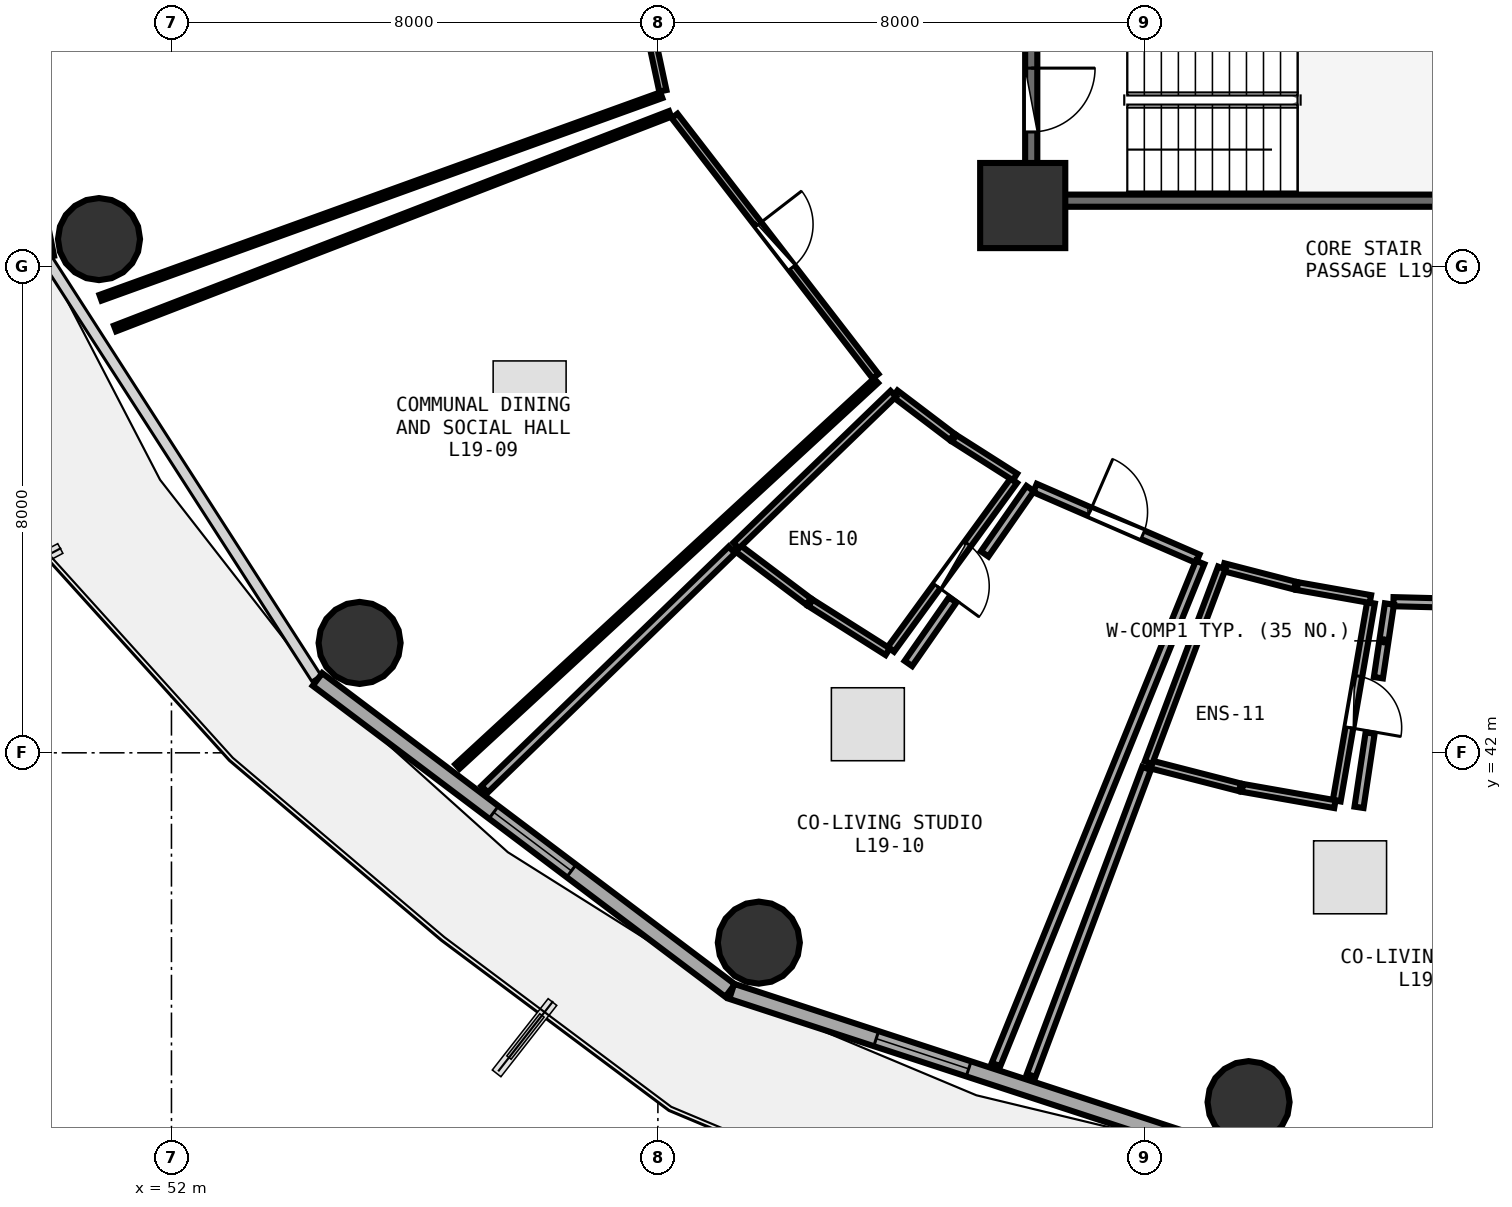
"""IFC4 building model, lengths in metres.
Left out: names, types, materials, properties, quantities, classifications, styles, units other than length and angle.
Written with IfcOpenShell. Run it as: python <this file> out.ifc"""

import sys

from ifc_helpers import new_model, si_unit, direction, frame, frame_2d, origin, origin_2d, place, context, subcontext, project, spatial, rectangle, circle, extrude, element, fill, save


model = new_model("IFC4")
c1 = context("Model", 3, precision=1e-05, world=origin(), true_north=direction((0.0, 1.0)))
c2 = subcontext(c1, "Body", "Model", "MODEL_VIEW")
j1 = project(units=[si_unit("LENGTHUNIT", "METRE"), si_unit("PLANEANGLEUNIT", "RADIAN")], contexts=[c1])
p1 = place(None, origin())
s1 = spatial("IfcSite", under=j1, at=p1, CompositionType="ELEMENT")
p2 = place(p1, origin())
s2 = spatial("IfcBuilding", under=s1, at=p2, CompositionType="ELEMENT")
p3 = place(p2, frame((0.0, 0.0, 76.35)))
s3 = spatial("IfcBuildingStorey", under=s2, at=p3, CompositionType="ELEMENT", Elevation=76.35)
p4 = place(p3, frame((66.0, 51.0, 0.0), z_axis=(0.0, 0.0, 1.0), x_axis=(1.0, 0.0, 0.0)))
e1 = element("IfcColumn", 1, at=p4, inside=s3, PredefinedType="PILASTER", context=c2, shape_type="SweptSolid", body=[
    extrude(rectangle(XDim=1.4, YDim=1.4, at=origin_2d()), origin(), (0.0, 0.0, 1.0), 3.75),
])
for number, where, z_axis, x_axis in (
    (2, (50.808, 50.448, 0.0), (0.0, 0.0, 1.0), (1.0, 0.0, 0.0)),
    (3, (55.094, 43.807, 0.0), (0.0, 0.0, 1.0), (1.0, 0.0, 0.0)),
    (4, (61.66, 38.878, 0.0), (0.0, 0.0, 1.0), (1.0, 0.0, 0.0)),
    (5, (69.714, 36.255, 0.0), (0.0, 0.0, 1.0), (1.0, 0.0, 0.0)),
):
    element("IfcColumn", number, at=place(p3, frame(where, z_axis=z_axis, x_axis=x_axis)), inside=s3, PredefinedType="COLUMN", context=c2, shape_type="SweptSolid", body=[
        extrude(circle(Radius=0.675, at=origin_2d()), origin(), (0.0, 0.0, 1.0), 3.75),
    ])
p5 = place(p3, frame((48.403, 57.985, 0.0), z_axis=(0.0, 0.0, 1.0), x_axis=(0.192581843632, -0.981280914674, 0.0)))
e6 = element("IfcWall", 6, at=p5, inside=s3, PredefinedType="SOLIDWALL", context=c2, shape_type="SweptSolid", body=[
    extrude(rectangle(XDim=7.987, YDim=0.26, at=frame_2d((3.993, 0.0))), origin(), (0.0, 0.0, 1.0), 3.475),
])
p6 = place(p5, frame((3.193, 0.0, 0.85)))
e7 = element("IfcOpeningElement", 7, at=p6, cuts=e6, PredefinedType="OPENING", context=c2, shape_type="SweptSolid", body=[
    extrude(rectangle(XDim=1.6, YDim=1.45, at=frame_2d((0.8, 0.725))), frame((0.0, 0.14, 0.0), z_axis=(0.0, -1.0, 0.0), x_axis=(1.0, 0.0, 0.0)), (0.0, 0.0, 1.0), 0.28),
])
p7 = place(p3, frame((54.401, 43.207, 0.0), z_axis=(0.0, 0.0, 1.0), x_axis=(0.798501507879, -0.601992808857, 0.0)))
e8 = element("IfcWall", 8, at=p7, inside=s3, PredefinedType="SOLIDWALL", context=c2, shape_type="SweptSolid", body=[
    extrude(rectangle(XDim=8.499, YDim=0.26, at=frame_2d((4.25, 0.0))), origin(), (0.0, 0.0, 1.0), 3.475),
])
p8 = place(p7, frame((3.63, 0.0, 0.85)))
e9 = element("IfcOpeningElement", 9, at=p8, cuts=e8, PredefinedType="OPENING", context=c2, shape_type="SweptSolid", body=[
    extrude(rectangle(XDim=1.6, YDim=1.45, at=frame_2d((0.8, 0.725))), frame((0.0, 0.14, 0.0), z_axis=(0.0, -1.0, 0.0), x_axis=(1.0, 0.0, 0.0)), (0.0, 0.0, 1.0), 0.28),
])
p9 = place(p3, frame((61.214, 38.077, 0.0), z_axis=(0.0, 0.0, 1.0), x_axis=(0.950471101963, -0.310812941064, 0.0)))
e10 = element("IfcWall", 10, at=p9, inside=s3, PredefinedType="SOLIDWALL", context=c2, shape_type="SweptSolid", body=[
    extrude(rectangle(XDim=8.76, YDim=0.26, at=frame_2d((4.38, 0.0))), origin(), (0.0, 0.0, 1.0), 3.475),
])
p10 = place(p9, frame((2.5, 0.0, 0.85)))
e11 = element("IfcOpeningElement", 11, at=p10, cuts=e10, PredefinedType="OPENING", context=c2, shape_type="SweptSolid", body=[
    extrude(rectangle(XDim=1.6, YDim=1.45, at=frame_2d((0.8, 0.725))), frame((0.0, 0.14, 0.0), z_axis=(0.0, -1.0, 0.0), x_axis=(1.0, 0.0, 0.0)), (0.0, 0.0, 1.0), 0.28),
])
p11 = place(p3, frame((66.26, 51.08, 0.0), z_axis=(0.0, 0.0, 1.0), x_axis=(1.0, 0.0, 0.0)))
e12 = element("IfcWall", 12, at=p11, inside=s3, PredefinedType="SHEAR", context=c2, shape_type="SweptSolid", body=[
    extrude(rectangle(XDim=7.16, YDim=0.2, at=frame_2d((3.58, 0.0))), origin(), (0.0, 0.0, 1.0), 3.49),
])
p12 = place(p3, frame((66.14, 54.27, 0.0), z_axis=(0.0, 0.0, 1.0), x_axis=(0.0, -1.0, 0.0)))
e13 = element("IfcWall", 13, at=p12, inside=s3, PredefinedType="SHEAR", context=c2, shape_type="SweptSolid", body=[
    extrude(rectangle(XDim=3.07, YDim=0.2, at=frame_2d((1.535, 0.0))), origin(), (0.0, 0.0, 1.0), 3.49),
])
p13 = place(p12, frame((1.01, 0.0, 0.0)))
e14 = element("IfcOpeningElement", 14, at=p13, cuts=e13, PredefinedType="OPENING", context=c2, shape_type="SweptSolid", body=[
    extrude(rectangle(XDim=1.05, YDim=2.1, at=frame_2d((0.525, 1.05))), frame((0.0, 0.11, 0.0), z_axis=(0.0, -1.0, 0.0), x_axis=(1.0, 0.0, 0.0)), (0.0, 0.0, 1.0), 0.22),
])
p14 = place(p3, frame((58.983, 58.012, 0.0), z_axis=(0.0, 0.0, 1.0), x_axis=(0.209586341226, -0.977790143933, 0.0)))
e15 = element("IfcWall", 15, at=p14, inside=s3, PredefinedType="PARTITIONING", context=c2, shape_type="SweptSolid", body=[
    extrude(rectangle(XDim=5.242, YDim=0.12, at=frame_2d((2.621, 0.0))), origin(), (0.0, 0.0, 1.0), 2.925),
])
p15 = place(p14, frame((2.171, 0.0, 0.0)))
e16 = element("IfcOpeningElement", 16, at=p15, cuts=e15, PredefinedType="OPENING", context=c2, shape_type="SweptSolid", body=[
    extrude(rectangle(XDim=0.9, YDim=2.08, at=frame_2d((0.45, 1.04))), frame((0.0, 0.07, 0.0), z_axis=(0.0, -1.0, 0.0), x_axis=(1.0, 0.0, 0.0)), (0.0, 0.0, 1.0), 0.14),
])
p16 = place(p3, frame((60.275, 52.473, 0.0), z_axis=(0.0, 0.0, 1.0), x_axis=(0.611167326409, -0.791501420801, 0.0)))
e17 = element("IfcWall", 17, at=p16, inside=s3, PredefinedType="PARTITIONING", context=c2, shape_type="SweptSolid", body=[
    extrude(rectangle(XDim=5.407, YDim=0.12, at=frame_2d((2.704, 0.0))), origin(), (0.0, 0.0, 1.0), 2.925),
])
p17 = place(p16, frame((2.254, 0.0, 0.0)))
e18 = element("IfcOpeningElement", 18, at=p17, cuts=e17, PredefinedType="OPENING", context=c2, shape_type="SweptSolid", body=[
    extrude(rectangle(XDim=0.9, YDim=2.08, at=frame_2d((0.45, 1.04))), frame((0.0, 0.07, 0.0), z_axis=(0.0, -1.0, 0.0), x_axis=(1.0, 0.0, 0.0)), (0.0, 0.0, 1.0), 0.14),
])
p18 = place(p3, frame((65.855, 46.477, 0.0), z_axis=(0.0, 0.0, 1.0), x_axis=(-0.589016516568, -0.808120995402, 0.0)))
e19 = element("IfcWall", 19, at=p18, inside=s3, PredefinedType="PLUMBINGWALL", context=c2, shape_type="SweptSolid", body=[
    extrude(rectangle(XDim=3.435, YDim=0.13, at=frame_2d((1.718, 0.0))), origin(), (0.0, 0.0, 1.0), 3.175),
])
p19 = place(p18, frame((1.288, 0.0, 0.0)))
e20 = element("IfcOpeningElement", 20, at=p19, cuts=e19, PredefinedType="OPENING", context=c2, shape_type="SweptSolid", body=[
    extrude(rectangle(XDim=0.86, YDim=2.05, at=frame_2d((0.43, 1.025))), frame((0.0, 0.075, 0.0), z_axis=(0.0, -1.0, 0.0), x_axis=(1.0, 0.0, 0.0)), (0.0, 0.0, 1.0), 0.15),
])
p20 = place(p3, frame((66.201, 46.355, 0.0), z_axis=(0.0, 0.0, 1.0), x_axis=(0.917173751057, -0.398487528503, 0.0)))
e21 = element("IfcWall", 21, at=p20, inside=s3, PredefinedType="PARTITIONING", context=c2, shape_type="SweptSolid", body=[
    extrude(rectangle(XDim=2.919, YDim=0.15, at=frame_2d((1.459, 0.0))), origin(), (0.0, 0.0, 1.0), 2.925),
])
p21 = place(p20, frame((0.984, 0.0, 0.0)))
e22 = element("IfcOpeningElement", 22, at=p21, cuts=e21, PredefinedType="OPENING", context=c2, shape_type="SweptSolid", body=[
    extrude(rectangle(XDim=0.95, YDim=2.08, at=frame_2d((0.475, 1.04))), frame((0.0, 0.085, 0.0), z_axis=(0.0, -1.0, 0.0), x_axis=(1.0, 0.0, 0.0)), (0.0, 0.0, 1.0), 0.17),
])
p22 = place(p3, frame((71.728, 44.466, 0.0), z_axis=(0.0, 0.0, 1.0), x_axis=(-0.170592496202, -0.985341666753, 0.0)))
e23 = element("IfcWall", 23, at=p22, inside=s3, PredefinedType="PLUMBINGWALL", context=c2, shape_type="SweptSolid", body=[
    extrude(rectangle(XDim=3.303, YDim=0.13, at=frame_2d((1.651, 0.0))), origin(), (0.0, 0.0, 1.0), 3.175),
])
p23 = place(p22, frame((1.222, 0.0, 0.0)))
e24 = element("IfcOpeningElement", 24, at=p23, cuts=e23, PredefinedType="OPENING", context=c2, shape_type="SweptSolid", body=[
    extrude(rectangle(XDim=0.86, YDim=2.05, at=frame_2d((0.43, 1.025))), frame((0.0, 0.075, 0.0), z_axis=(0.0, -1.0, 0.0), x_axis=(1.0, 0.0, 0.0)), (0.0, 0.0, 1.0), 0.15),
])
p24 = place(p3, frame((72.097, 44.486, 0.0), z_axis=(0.0, 0.0, 1.0), x_axis=(0.999671268913, -0.025638917871, 0.0)))
e25 = element("IfcWall", 25, at=p24, inside=s3, PredefinedType="PARTITIONING", context=c2, shape_type="SweptSolid", body=[
    extrude(rectangle(XDim=2.971, YDim=0.15, at=frame_2d((1.485, 0.0))), origin(), (0.0, 0.0, 1.0), 3.48),
])
p25 = place(p24, frame((1.01, 0.0, 0.0)))
e26 = element("IfcOpeningElement", 26, at=p25, cuts=e25, PredefinedType="OPENING", context=c2, shape_type="SweptSolid", body=[
    extrude(rectangle(XDim=0.95, YDim=2.08, at=frame_2d((0.475, 1.04))), frame((0.0, 0.085, 0.0), z_axis=(0.0, -1.0, 0.0), x_axis=(1.0, 0.0, 0.0)), (0.0, 0.0, 1.0), 0.17),
])
p26 = place(p3, frame((60.056, 52.814, 0.0), z_axis=(0.0, 0.0, 1.0), x_axis=(-0.940543515483, -0.339673218671, 0.0)))
e27 = element("IfcWall", 27, at=p26, inside=s3, PredefinedType="PARTITIONING", context=c2, shape_type="SweptSolid", body=[
    extrude(rectangle(XDim=9.806, YDim=0.1, at=frame_2d((4.903, 0.0))), origin(), (0.0, 0.0, 1.0), 2.925),
])
p27 = place(p3, frame((63.587, 48.119, 0.0), z_axis=(0.0, 0.0, 1.0), x_axis=(-0.735387084409, -0.677647279995, 0.0)))
e28 = element("IfcWall", 28, at=p27, inside=s3, PredefinedType="PARTITIONING", context=c2, shape_type="SweptSolid", body=[
    extrude(rectangle(XDim=9.361, YDim=0.1, at=frame_2d((4.681, 0.0))), origin(), (0.0, 0.0, 1.0), 2.975),
])
p28 = place(p3, frame((51.072, 48.979, 0.0), z_axis=(0.0, 0.0, 1.0), x_axis=(0.932757339165, 0.360504849112, 0.0)))
e29 = element("IfcWall", 29, at=p28, inside=s3, PredefinedType="PARTITIONING", context=c2, shape_type="SweptSolid", body=[
    extrude(rectangle(XDim=9.786, YDim=0.1, at=frame_2d((4.893, 0.0))), origin(), (0.0, 0.0, 1.0), 2.925),
])
p29 = place(p3, frame((63.901, 47.907, 0.0), z_axis=(0.0, 0.0, 1.0), x_axis=(0.796629313308, -0.604468144056, 0.0)))
e30 = element("IfcWall", 30, at=p29, inside=s3, PredefinedType="PLUMBINGWALL", context=c2, shape_type="SweptSolid", body=[
    extrude(rectangle(XDim=1.178, YDim=0.13, at=frame_2d((0.589, 0.0))), origin(), (0.0, 0.0, 1.0), 2.925),
])
p30 = place(p3, frame((64.872, 47.172, 0.0), z_axis=(0.0, 0.0, 1.0), x_axis=(0.843822426876, -0.536622504095, 0.0)))
e31 = element("IfcWall", 31, at=p30, inside=s3, PredefinedType="PLUMBINGWALL", context=c2, shape_type="SweptSolid", body=[
    extrude(rectangle(XDim=1.187, YDim=0.13, at=frame_2d((0.593, 0.0))), origin(), (0.0, 0.0, 1.0), 3.48),
])
p31 = place(p3, frame((63.779, 43.663, 0.0), z_axis=(0.0, 0.0, 1.0), x_axis=(-0.844931806669, 0.53487404319, 0.0)))
e32 = element("IfcWall", 32, at=p31, inside=s3, PredefinedType="PLUMBINGWALL", context=c2, shape_type="SweptSolid", body=[
    extrude(rectangle(XDim=1.501, YDim=0.13, at=frame_2d((0.75, 0.0))), origin(), (0.0, 0.0, 1.0), 2.925),
])
p32 = place(p3, frame((62.478, 44.488, 0.0), z_axis=(0.0, 0.0, 1.0), x_axis=(-0.798935684124, 0.601416471868, 0.0)))
e33 = element("IfcWall", 33, at=p32, inside=s3, PredefinedType="PLUMBINGWALL", context=c2, shape_type="SweptSolid", body=[
    extrude(rectangle(XDim=1.488, YDim=0.13, at=frame_2d((0.744, 0.0))), origin(), (0.0, 0.0, 1.0), 3.175),
])
p33 = place(p3, frame((61.287, 45.409, 0.0), z_axis=(0.0, 0.0, 1.0), x_axis=(0.719134400332, 0.694871005481, 0.0)))
e34 = element("IfcWall", 34, at=p33, inside=s3, PredefinedType="PLUMBINGWALL", context=c2, shape_type="SweptSolid", body=[
    extrude(rectangle(XDim=3.592, YDim=0.13, at=frame_2d((1.796, 0.0))), origin(), (0.0, 0.0, 1.0), 3.175),
])
p34 = place(p3, frame((68.918, 45.131, 0.0), z_axis=(0.0, 0.0, 1.0), x_axis=(-0.376588613193, -0.926380600193, 0.0)))
e35 = element("IfcWall", 35, at=p34, inside=s3, PredefinedType="PARTITIONING", context=c2, shape_type="SweptSolid", body=[
    extrude(rectangle(XDim=8.914, YDim=0.15, at=frame_2d((4.457, 0.0))), origin(), (0.0, 0.0, 1.0), 2.925),
])
p35 = place(p3, frame((57.15, 41.401, 0.0), z_axis=(0.0, 0.0, 1.0), x_axis=(0.718527749954, 0.695498290829, 0.0)))
e36 = element("IfcWall", 36, at=p35, inside=s3, PredefinedType="PARTITIONING", context=c2, shape_type="SweptSolid", body=[
    extrude(rectangle(XDim=5.661, YDim=0.15, at=frame_2d((2.831, 0.0))), origin(), (0.0, 0.0, 1.0), 2.975),
])
p36 = place(p3, frame((64.12, 43.469, 0.0), z_axis=(0.0, 0.0, 1.0), x_axis=(0.571339432424, 0.820713867897, 0.0)))
e37 = element("IfcWall", 37, at=p36, inside=s3, PredefinedType="PARTITIONING", context=c2, shape_type="SweptSolid", body=[
    extrude(rectangle(XDim=1.275, YDim=0.15, at=frame_2d((0.637, 0.0))), origin(), (0.0, 0.0, 1.0), 3.175),
])
p37 = place(p3, frame((65.374, 45.27, 0.0), z_axis=(0.0, 0.0, 1.0), x_axis=(0.57134818524, 0.82070777456, 0.0)))
e38 = element("IfcWall", 38, at=p37, inside=s3, PredefinedType="PARTITIONING", context=c2, shape_type="SweptSolid", body=[
    extrude(rectangle(XDim=1.311, YDim=0.15, at=frame_2d((0.656, 0.0))), origin(), (0.0, 0.0, 1.0), 3.235),
])
p38 = place(p3, frame((69.3, 45.054, 0.0), z_axis=(0.0, 0.0, 1.0), x_axis=(0.968247539973, -0.249993402585, 0.0)))
e39 = element("IfcWall", 39, at=p38, inside=s3, PredefinedType="PLUMBINGWALL", context=c2, shape_type="SweptSolid", body=[
    extrude(rectangle(XDim=1.216, YDim=0.13, at=frame_2d((0.608, 0.0))), origin(), (0.0, 0.0, 1.0), 3.48),
])
p39 = place(p3, frame((70.517, 44.741, 0.0), z_axis=(0.0, 0.0, 1.0), x_axis=(0.98466652622, -0.174447218786, 0.0)))
e40 = element("IfcWall", 40, at=p39, inside=s3, PredefinedType="PLUMBINGWALL", context=c2, shape_type="SweptSolid", body=[
    extrude(rectangle(XDim=1.22, YDim=0.13, at=frame_2d((0.61, 0.0))), origin(), (0.0, 0.0, 1.0), 3.48),
])
p40 = place(p3, frame((71.134, 41.156, 0.0), z_axis=(0.0, 0.0, 1.0), x_axis=(-0.984831248295, 0.173514876545, 0.0)))
e41 = element("IfcWall", 41, at=p40, inside=s3, PredefinedType="PLUMBINGWALL", context=c2, shape_type="SweptSolid", body=[
    extrude(rectangle(XDim=1.545, YDim=0.13, at=frame_2d((0.772, 0.0))), origin(), (0.0, 0.0, 1.0), 3.48),
])
p41 = place(p3, frame((69.573, 41.432, 0.0), z_axis=(0.0, 0.0, 1.0), x_axis=(-0.968594416315, 0.248646046989, 0.0)))
e42 = element("IfcWall", 42, at=p41, inside=s3, PredefinedType="PLUMBINGWALL", context=c2, shape_type="SweptSolid", body=[
    extrude(rectangle(XDim=1.541, YDim=0.13, at=frame_2d((0.77, 0.0))), origin(), (0.0, 0.0, 1.0), 2.925),
])
p42 = place(p3, frame((68.069, 41.839, 0.0), z_axis=(0.0, 0.0, 1.0), x_axis=(0.352202531552, 0.935923809275, 0.0)))
e43 = element("IfcWall", 43, at=p42, inside=s3, PredefinedType="PLUMBINGWALL", context=c2, shape_type="SweptSolid", body=[
    extrude(rectangle(XDim=3.421, YDim=0.13, at=frame_2d((1.71, 0.0))), origin(), (0.0, 0.0, 1.0), 2.925),
])
p43 = place(p3, frame((66.139, 36.694, 0.0), z_axis=(0.0, 0.0, 1.0), x_axis=(0.351589591196, 0.936154239088, 0.0)))
e44 = element("IfcWall", 44, at=p43, inside=s3, PredefinedType="PARTITIONING", context=c2, shape_type="SweptSolid", body=[
    extrude(rectangle(XDim=5.395, YDim=0.15, at=frame_2d((2.697, 0.0))), origin(), (0.0, 0.0, 1.0), 2.975),
])
p44 = place(p3, frame((71.531, 41.104, 0.0), z_axis=(0.0, 0.0, 1.0), x_axis=(0.147866770411, 0.989007289259, 0.0)))
e45 = element("IfcWall", 45, at=p44, inside=s3, PredefinedType="PARTITIONING", context=c2, shape_type="SweptSolid", body=[
    extrude(rectangle(XDim=1.235, YDim=0.15, at=frame_2d((0.618, 0.0))), origin(), (0.0, 0.0, 1.0), 3.175),
])
p45 = place(p3, frame((71.85, 43.235, 0.0), z_axis=(0.0, 0.0, 1.0), x_axis=(0.14797037904, 0.988991793154, 0.0)))
e46 = element("IfcWall", 46, at=p45, inside=s3, PredefinedType="PARTITIONING", context=c2, shape_type="SweptSolid", body=[
    extrude(rectangle(XDim=1.226, YDim=0.15, at=frame_2d((0.613, 0.0))), origin(), (0.0, 0.0, 1.0), 3.48),
])
p46 = place(p8, origin())
e47 = element("IfcWindow", 47, at=p46, inside=s3, PartitioningType="SINGLE_PANEL", PredefinedType="WINDOW", context=c2, shape_type="SweptSolid", body=[
    extrude(rectangle(XDim=1.6, YDim=1.45, at=frame_2d((0.8, 0.725))), frame((0.0, 0.03, 0.0), z_axis=(0.0, -1.0, 0.0), x_axis=(1.0, 0.0, 0.0)), (0.0, 0.0, 1.0), 0.06),
])
fill(e9, e47)
p47 = place(p10, origin())
e48 = element("IfcWindow", 48, at=p47, inside=s3, PartitioningType="SINGLE_PANEL", PredefinedType="WINDOW", context=c2, shape_type="SweptSolid", body=[
    extrude(rectangle(XDim=1.6, YDim=1.45, at=frame_2d((0.8, 0.725))), frame((0.0, 0.03, 0.0), z_axis=(0.0, -1.0, 0.0), x_axis=(1.0, 0.0, 0.0)), (0.0, 0.0, 1.0), 0.06),
])
fill(e11, e48)
p48 = place(p13, origin())
e49 = element("IfcDoor", 49, at=p48, inside=s3, OperationType="SINGLE_SWING_LEFT", PredefinedType="DOOR", context=c2, shape_type="SweptSolid", body=[
    extrude(rectangle(XDim=1.05, YDim=2.1, at=frame_2d((0.525, 1.05))), frame((0.0, 0.025, 0.0), z_axis=(0.0, -1.0, 0.0), x_axis=(1.0, 0.0, 0.0)), (0.0, 0.0, 1.0), 0.05),
])
fill(e14, e49)
p49 = place(p17, origin())
e50 = element("IfcDoor", 50, at=p49, inside=s3, OperationType="SINGLE_SWING_LEFT", PredefinedType="DOOR", context=c2, shape_type="SweptSolid", body=[
    extrude(rectangle(XDim=0.9, YDim=2.08, at=frame_2d((0.45, 1.04))), frame((0.0, 0.025, 0.0), z_axis=(0.0, -1.0, 0.0), x_axis=(1.0, 0.0, 0.0)), (0.0, 0.0, 1.0), 0.05),
])
fill(e18, e50)
p50 = place(p19, origin())
e51 = element("IfcDoor", 51, at=p50, inside=s3, OperationType="SINGLE_SWING_RIGHT", PredefinedType="DOOR", context=c2, shape_type="SweptSolid", body=[
    extrude(rectangle(XDim=0.86, YDim=2.05, at=frame_2d((0.43, 1.025))), frame((0.0, 0.025, 0.0), z_axis=(0.0, -1.0, 0.0), x_axis=(1.0, 0.0, 0.0)), (0.0, 0.0, 1.0), 0.05),
])
fill(e20, e51)
p51 = place(p21, origin())
e52 = element("IfcDoor", 52, at=p51, inside=s3, OperationType="SINGLE_SWING_LEFT", PredefinedType="DOOR", context=c2, shape_type="SweptSolid", body=[
    extrude(rectangle(XDim=0.95, YDim=2.08, at=frame_2d((0.475, 1.04))), frame((0.0, 0.025, 0.0), z_axis=(0.0, -1.0, 0.0), x_axis=(1.0, 0.0, 0.0)), (0.0, 0.0, 1.0), 0.05),
])
fill(e22, e52)
p52 = place(p23, origin())
e53 = element("IfcDoor", 53, at=p52, inside=s3, OperationType="SINGLE_SWING_RIGHT", PredefinedType="DOOR", context=c2, shape_type="SweptSolid", body=[
    extrude(rectangle(XDim=0.86, YDim=2.05, at=frame_2d((0.43, 1.025))), frame((0.0, 0.025, 0.0), z_axis=(0.0, -1.0, 0.0), x_axis=(1.0, 0.0, 0.0)), (0.0, 0.0, 1.0), 0.05),
])
fill(e24, e53)
save(model, sys.argv[1])
